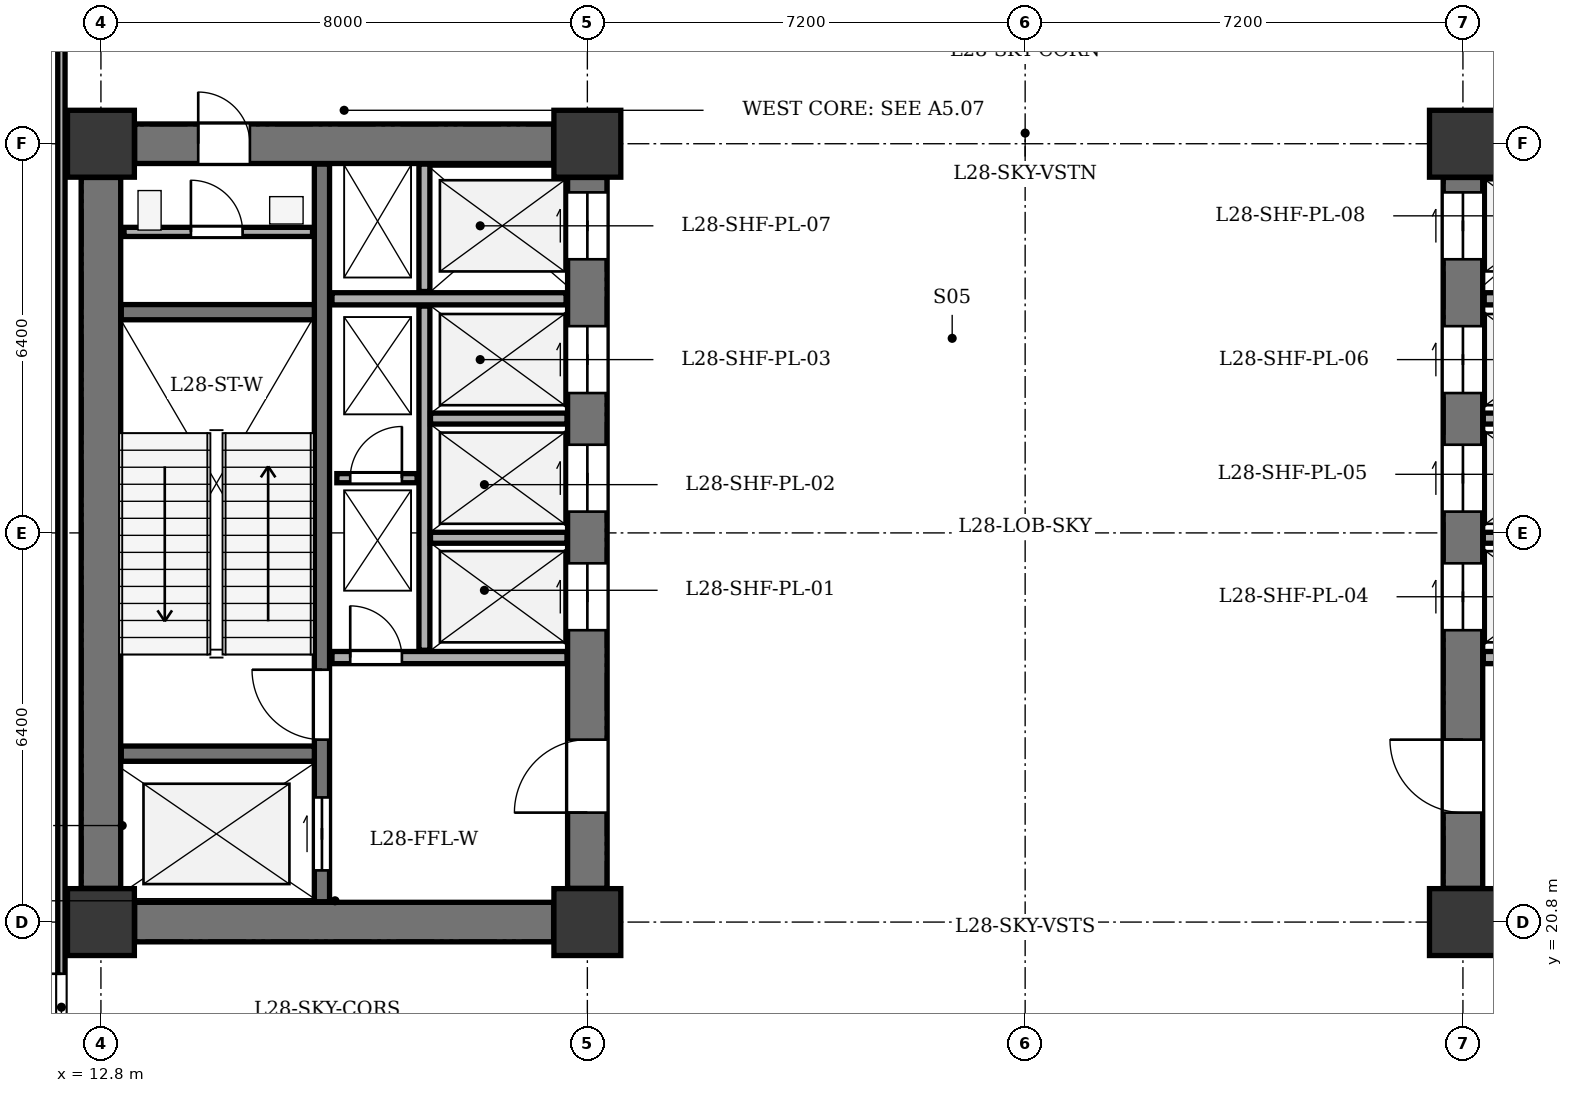
"""IFC4 building model, lengths in metres.
Left out: names, types, materials, properties, quantities, classifications, styles, units other than length and angle.
Written with IfcOpenShell. Run it as: python <this file> out.ifc"""

import sys

from ifc_helpers import new_model, si_unit, direction, frame, frame_2d, origin, origin_2d, place, context, subcontext, project, spatial, rectangle, extrude, element, fill, save


model = new_model("IFC4")
c1 = context("Model", 3, precision=1e-05, world=origin(), true_north=direction((0.0, 1.0)))
c2 = subcontext(c1, "Body", "Model", "MODEL_VIEW")
j1 = project(units=[si_unit("LENGTHUNIT", "METRE"), si_unit("PLANEANGLEUNIT", "RADIAN")], contexts=[c1])
p1 = place(None, origin())
s1 = spatial("IfcSite", under=j1, at=p1, CompositionType="ELEMENT")
p2 = place(p1, origin())
s2 = spatial("IfcBuilding", under=s1, at=p2, CompositionType="ELEMENT")
p3 = place(p2, frame((0.0, 0.0, 115.5)))
s3 = spatial("IfcBuildingStorey", under=s2, at=p3, CompositionType="ELEMENT", Elevation=115.5)
for number, where, z_axis, x_axis in (
    (1, (12.8, 20.8, 0.0), (0.0, 0.0, 1.0), (1.0, 0.0, 0.0)),
    (2, (20.8, 20.8, 0.0), (0.0, 0.0, 1.0), (1.0, 0.0, 0.0)),
    (3, (12.8, 33.6, 0.0), (0.0, 0.0, 1.0), (1.0, 0.0, 0.0)),
    (4, (20.8, 33.6, 0.0), (0.0, 0.0, 1.0), (1.0, 0.0, 0.0)),
    (5, (35.2, 20.8, 0.0), (0.0, 0.0, 1.0), (1.0, 0.0, 0.0)),
    (6, (35.2, 33.6, 0.0), (0.0, 0.0, 1.0), (1.0, 0.0, 0.0)),
):
    element("IfcColumn", number, at=place(p3, frame(where, z_axis=z_axis, x_axis=x_axis)), inside=s3, PredefinedType="COLUMN", context=c2, shape_type="SweptSolid", body=[
        extrude(rectangle(XDim=1.1, YDim=1.1, at=origin_2d()), origin(), (0.0, 0.0, 1.0), 4.8),
    ])
p4 = place(p3, frame((12.8, 21.355, 0.0), z_axis=(0.0, 0.0, 1.0), x_axis=(0.0, 1.0, 0.0)))
e7 = element("IfcWall", 7, at=p4, inside=s3, PredefinedType="SHEAR", context=c2, shape_type="SweptSolid", body=[
    extrude(rectangle(XDim=11.69, YDim=0.65, at=frame_2d((5.845, 0.0))), origin(), (0.0, 0.0, 1.0), 4.35),
])
p5 = place(p3, frame((13.355, 20.8, 0.0), z_axis=(0.0, 0.0, 1.0), x_axis=(1.0, 0.0, 0.0)))
e8 = element("IfcWall", 8, at=p5, inside=s3, PredefinedType="SHEAR", context=c2, shape_type="SweptSolid", body=[
    extrude(rectangle(XDim=6.89, YDim=0.65, at=frame_2d((3.445, 0.0))), origin(), (0.0, 0.0, 1.0), 4.35),
])
p6 = place(p3, frame((13.355, 33.6, 0.0), z_axis=(0.0, 0.0, 1.0), x_axis=(1.0, 0.0, 0.0)))
e9 = element("IfcWall", 9, at=p6, inside=s3, PredefinedType="SHEAR", context=c2, shape_type="SweptSolid", body=[
    extrude(rectangle(XDim=6.89, YDim=0.65, at=frame_2d((3.445, 0.0))), origin(), (0.0, 0.0, 1.0), 4.35),
])
p7 = place(p6, frame((1.045, 0.0, 0.0)))
e10 = element("IfcOpeningElement", 10, at=p7, cuts=e9, PredefinedType="OPENING", context=c2, shape_type="SweptSolid", body=[
    extrude(rectangle(XDim=0.85, YDim=2.02, at=frame_2d((0.425, 1.01))), frame((0.0, 0.335, 0.0), z_axis=(0.0, -1.0, 0.0), x_axis=(1.0, 0.0, 0.0)), (0.0, 0.0, 1.0), 0.67),
])
p8 = place(p3, frame((20.8, 21.355, 0.0), z_axis=(0.0, 0.0, 1.0), x_axis=(0.0, 1.0, 0.0)))
e11 = element("IfcWall", 11, at=p8, inside=s3, PredefinedType="SHEAR", context=c2, shape_type="SweptSolid", body=[
    extrude(rectangle(XDim=11.69, YDim=0.65, at=frame_2d((5.845, 0.0))), origin(), (0.0, 0.0, 1.0), 4.35),
])
p9 = place(p8, frame((1.245, 0.0, 0.0)))
e12 = element("IfcOpeningElement", 12, at=p9, cuts=e11, PredefinedType="OPENING", context=c2, shape_type="SweptSolid", body=[
    extrude(rectangle(XDim=1.2, YDim=2.15, at=frame_2d((0.6, 1.075))), frame((0.0, 0.335, 0.0), z_axis=(0.0, -1.0, 0.0), x_axis=(1.0, 0.0, 0.0)), (0.0, 0.0, 1.0), 0.67),
])
p10 = place(p8, frame((4.245, 0.0, 0.0)))
e13 = element("IfcOpeningElement", 13, at=p10, cuts=e11, PredefinedType="OPENING", context=c2, shape_type="SweptSolid", body=[
    extrude(rectangle(XDim=1.1, YDim=2.1, at=frame_2d((0.55, 1.05))), frame((0.0, 0.335, 0.0), z_axis=(0.0, -1.0, 0.0), x_axis=(1.0, 0.0, 0.0)), (0.0, 0.0, 1.0), 0.67),
])
p11 = place(p8, frame((6.195, 0.0, 0.0)))
e14 = element("IfcOpeningElement", 14, at=p11, cuts=e11, PredefinedType="OPENING", context=c2, shape_type="SweptSolid", body=[
    extrude(rectangle(XDim=1.1, YDim=2.1, at=frame_2d((0.55, 1.05))), frame((0.0, 0.335, 0.0), z_axis=(0.0, -1.0, 0.0), x_axis=(1.0, 0.0, 0.0)), (0.0, 0.0, 1.0), 0.67),
])
p12 = place(p8, frame((8.145, 0.0, 0.0)))
e15 = element("IfcOpeningElement", 15, at=p12, cuts=e11, PredefinedType="OPENING", context=c2, shape_type="SweptSolid", body=[
    extrude(rectangle(XDim=1.1, YDim=2.1, at=frame_2d((0.55, 1.05))), frame((0.0, 0.335, 0.0), z_axis=(0.0, -1.0, 0.0), x_axis=(1.0, 0.0, 0.0)), (0.0, 0.0, 1.0), 0.67),
])
p13 = place(p8, frame((10.345, 0.0, 0.0)))
e16 = element("IfcOpeningElement", 16, at=p13, cuts=e11, PredefinedType="OPENING", context=c2, shape_type="SweptSolid", body=[
    extrude(rectangle(XDim=1.1, YDim=2.1, at=frame_2d((0.55, 1.05))), frame((0.0, 0.335, 0.0), z_axis=(0.0, -1.0, 0.0), x_axis=(1.0, 0.0, 0.0)), (0.0, 0.0, 1.0), 0.67),
])
p14 = place(p3, frame((16.435, 21.135, 0.0), z_axis=(0.0, 0.0, 1.0), x_axis=(0.0, 1.0, 0.0)))
e17 = element("IfcWall", 17, at=p14, inside=s3, PredefinedType="SHEAR", context=c2, shape_type="SweptSolid", body=[
    extrude(rectangle(XDim=12.13, YDim=0.25, at=frame_2d((6.065, 0.0))), origin(), (0.0, 0.0, 1.0), 4.35),
])
p15 = place(p14, frame((0.515, 0.0, 0.0)))
e18 = element("IfcOpeningElement", 18, at=p15, cuts=e17, PredefinedType="OPENING", context=c2, shape_type="SweptSolid", body=[
    extrude(rectangle(XDim=1.2, YDim=2.15, at=frame_2d((0.6, 1.075))), frame((0.0, 0.135, 0.0), z_axis=(0.0, -1.0, 0.0), x_axis=(1.0, 0.0, 0.0)), (0.0, 0.0, 1.0), 0.27),
])
p16 = place(p14, frame((2.665, 0.0, 0.0)))
e19 = element("IfcOpeningElement", 19, at=p16, cuts=e17, PredefinedType="OPENING", context=c2, shape_type="SweptSolid", body=[
    extrude(rectangle(XDim=1.15, YDim=2.15, at=frame_2d((0.575, 1.075))), frame((0.0, 0.135, 0.0), z_axis=(0.0, -1.0, 0.0), x_axis=(1.0, 0.0, 0.0)), (0.0, 0.0, 1.0), 0.27),
])
for number, where, z_axis, x_axis in (
    (20, (13.135, 23.57, 0.0), (0.0, 0.0, 1.0), (1.0, 0.0, 0.0)),
    (21, (13.135, 30.83, 0.0), (0.0, 0.0, 1.0), (1.0, 0.0, 0.0)),
):
    element("IfcWall", number, at=place(p3, frame(where, z_axis=z_axis, x_axis=x_axis)), inside=s3, PredefinedType="SHEAR", context=c2, shape_type="SweptSolid", body=[
        extrude(rectangle(XDim=3.175, YDim=0.25, at=frame_2d((1.587, 0.0))), origin(), (0.0, 0.0, 1.0), 4.35),
    ])
p17 = place(p3, frame((16.6, 25.15, 0.0), z_axis=(0.0, 0.0, 1.0), x_axis=(1.0, 0.0, 0.0)))
e22 = element("IfcWall", 22, at=p17, inside=s3, PredefinedType="SOLIDWALL", context=c2, shape_type="SweptSolid", body=[
    extrude(rectangle(XDim=3.865, YDim=0.2, at=frame_2d((1.933, 0.0))), origin(), (0.0, 0.0, 1.0), 4.35),
])
p18 = place(p17, frame((0.3, 0.0, 0.0)))
e23 = element("IfcOpeningElement", 23, at=p18, cuts=e22, PredefinedType="OPENING", context=c2, shape_type="SweptSolid", body=[
    extrude(rectangle(XDim=0.85, YDim=2.02, at=frame_2d((0.425, 1.01))), frame((0.0, 0.11, 0.0), z_axis=(0.0, -1.0, 0.0), x_axis=(1.0, 0.0, 0.0)), (0.0, 0.0, 1.0), 0.22),
])
p19 = place(p3, frame((16.6, 31.05, 0.0), z_axis=(0.0, 0.0, 1.0), x_axis=(1.0, 0.0, 0.0)))
e24 = element("IfcWall", 24, at=p19, inside=s3, PredefinedType="SOLIDWALL", context=c2, shape_type="SweptSolid", body=[
    extrude(rectangle(XDim=3.85, YDim=0.2, at=frame_2d((1.925, 0.0))), origin(), (0.0, 0.0, 1.0), 4.35),
])
p20 = place(p3, frame((18.12, 25.27, 0.0), z_axis=(0.0, 0.0, 1.0), x_axis=(0.0, 1.0, 0.0)))
e25 = element("IfcWall", 25, at=p20, inside=s3, PredefinedType="PARTITIONING", context=c2, shape_type="SweptSolid", body=[
    extrude(rectangle(XDim=5.66, YDim=0.18, at=frame_2d((2.83, 0.0))), origin(), (0.0, 0.0, 1.0), 4.35),
])
p21 = place(p3, frame((18.12, 31.17, 0.0), z_axis=(0.0, 0.0, 1.0), x_axis=(0.0, 1.0, 0.0)))
e26 = element("IfcWall", 26, at=p21, inside=s3, PredefinedType="PARTITIONING", context=c2, shape_type="SweptSolid", body=[
    extrude(rectangle(XDim=2.095, YDim=0.18, at=frame_2d((1.047, 0.0))), origin(), (0.0, 0.0, 1.0), 4.35),
])
for number, where, z_axis, x_axis in (
    (27, (18.22, 27.12, 0.0), (0.0, 0.0, 1.0), (1.0, 0.0, 0.0)),
    (28, (18.22, 29.08, 0.0), (0.0, 0.0, 1.0), (1.0, 0.0, 0.0)),
):
    element("IfcWall", number, at=place(p3, frame(where, z_axis=z_axis, x_axis=x_axis)), inside=s3, PredefinedType="PARTITIONING", context=c2, shape_type="SweptSolid", body=[
        extrude(rectangle(XDim=2.245, YDim=0.18, at=frame_2d((1.123, 0.0))), origin(), (0.0, 0.0, 1.0), 4.35),
    ])
p22 = place(p3, frame((35.2, 21.355, 0.0), z_axis=(0.0, 0.0, 1.0), x_axis=(0.0, 1.0, 0.0)))
e29 = element("IfcWall", 29, at=p22, inside=s3, PredefinedType="SHEAR", context=c2, shape_type="SweptSolid", body=[
    extrude(rectangle(XDim=11.69, YDim=0.65, at=frame_2d((5.845, 0.0))), origin(), (0.0, 0.0, 1.0), 4.35),
])
p23 = place(p22, frame((1.245, 0.0, 0.0)))
e30 = element("IfcOpeningElement", 30, at=p23, cuts=e29, PredefinedType="OPENING", context=c2, shape_type="SweptSolid", body=[
    extrude(rectangle(XDim=1.2, YDim=2.15, at=frame_2d((0.6, 1.075))), frame((0.0, 0.335, 0.0), z_axis=(0.0, -1.0, 0.0), x_axis=(1.0, 0.0, 0.0)), (0.0, 0.0, 1.0), 0.67),
])
p24 = place(p22, frame((4.245, 0.0, 0.0)))
e31 = element("IfcOpeningElement", 31, at=p24, cuts=e29, PredefinedType="OPENING", context=c2, shape_type="SweptSolid", body=[
    extrude(rectangle(XDim=1.1, YDim=2.1, at=frame_2d((0.55, 1.05))), frame((0.0, 0.335, 0.0), z_axis=(0.0, -1.0, 0.0), x_axis=(1.0, 0.0, 0.0)), (0.0, 0.0, 1.0), 0.67),
])
p25 = place(p22, frame((6.195, 0.0, 0.0)))
e32 = element("IfcOpeningElement", 32, at=p25, cuts=e29, PredefinedType="OPENING", context=c2, shape_type="SweptSolid", body=[
    extrude(rectangle(XDim=1.1, YDim=2.1, at=frame_2d((0.55, 1.05))), frame((0.0, 0.335, 0.0), z_axis=(0.0, -1.0, 0.0), x_axis=(1.0, 0.0, 0.0)), (0.0, 0.0, 1.0), 0.67),
])
p26 = place(p22, frame((8.145, 0.0, 0.0)))
e33 = element("IfcOpeningElement", 33, at=p26, cuts=e29, PredefinedType="OPENING", context=c2, shape_type="SweptSolid", body=[
    extrude(rectangle(XDim=1.1, YDim=2.1, at=frame_2d((0.55, 1.05))), frame((0.0, 0.335, 0.0), z_axis=(0.0, -1.0, 0.0), x_axis=(1.0, 0.0, 0.0)), (0.0, 0.0, 1.0), 0.67),
])
p27 = place(p22, frame((10.345, 0.0, 0.0)))
e34 = element("IfcOpeningElement", 34, at=p27, cuts=e29, PredefinedType="OPENING", context=c2, shape_type="SweptSolid", body=[
    extrude(rectangle(XDim=1.1, YDim=2.1, at=frame_2d((0.55, 1.05))), frame((0.0, 0.335, 0.0), z_axis=(0.0, -1.0, 0.0), x_axis=(1.0, 0.0, 0.0)), (0.0, 0.0, 1.0), 0.67),
])
p28 = place(p3, frame((35.535, 25.15, 0.0), z_axis=(0.0, 0.0, 1.0), x_axis=(1.0, 0.0, 0.0)))
e35 = element("IfcWall", 35, at=p28, inside=s3, PredefinedType="SOLIDWALL", context=c2, shape_type="SweptSolid", body=[
    extrude(rectangle(XDim=3.865, YDim=0.2, at=frame_2d((1.933, 0.0))), origin(), (0.0, 0.0, 1.0), 4.35),
])
p29 = place(p3, frame((35.55, 31.05, 0.0), z_axis=(0.0, 0.0, 1.0), x_axis=(1.0, 0.0, 0.0)))
e36 = element("IfcWall", 36, at=p29, inside=s3, PredefinedType="SOLIDWALL", context=c2, shape_type="SweptSolid", body=[
    extrude(rectangle(XDim=2.25, YDim=0.2, at=frame_2d((1.125, 0.0))), origin(), (0.0, 0.0, 1.0), 4.35),
])
for number, where, z_axis, x_axis in (
    (37, (35.535, 27.12, 0.0), (0.0, 0.0, 1.0), (1.0, 0.0, 0.0)),
    (38, (35.535, 29.08, 0.0), (0.0, 0.0, 1.0), (1.0, 0.0, 0.0)),
):
    element("IfcWall", number, at=place(p3, frame(where, z_axis=z_axis, x_axis=x_axis)), inside=s3, PredefinedType="PARTITIONING", context=c2, shape_type="SweptSolid", body=[
        extrude(rectangle(XDim=2.245, YDim=0.18, at=frame_2d((1.123, 0.0))), origin(), (0.0, 0.0, 1.0), 4.35),
    ])
p30 = place(p3, frame((13.18, 32.15, 0.0), z_axis=(0.0, 0.0, 1.0), x_axis=(1.0, 0.0, 0.0)))
e39 = element("IfcWall", 39, at=p30, inside=s3, PredefinedType="PARTITIONING", context=c2, shape_type="SweptSolid", body=[
    extrude(rectangle(XDim=3.1, YDim=0.15, at=frame_2d((1.55, 0.0))), origin(), (0.0, 0.0, 1.0), 4.35),
])
p31 = place(p30, frame((1.1, 0.0, 0.0)))
e40 = element("IfcOpeningElement", 40, at=p31, cuts=e39, PredefinedType="OPENING", context=c2, shape_type="SweptSolid", body=[
    extrude(rectangle(XDim=0.85, YDim=2.02, at=frame_2d((0.425, 1.01))), frame((0.0, 0.085, 0.0), z_axis=(0.0, -1.0, 0.0), x_axis=(1.0, 0.0, 0.0)), (0.0, 0.0, 1.0), 0.17),
])
p32 = place(p3, frame((16.68, 28.1, 0.0), z_axis=(0.0, 0.0, 1.0), x_axis=(1.0, 0.0, 0.0)))
e41 = element("IfcWall", 41, at=p32, inside=s3, PredefinedType="PARTITIONING", context=c2, shape_type="SweptSolid", body=[
    extrude(rectangle(XDim=1.32, YDim=0.15, at=frame_2d((0.66, 0.0))), origin(), (0.0, 0.0, 1.0), 4.35),
])
p33 = place(p32, frame((0.22, 0.0, 0.0)))
e42 = element("IfcOpeningElement", 42, at=p33, cuts=e41, PredefinedType="OPENING", context=c2, shape_type="SweptSolid", body=[
    extrude(rectangle(XDim=0.85, YDim=2.02, at=frame_2d((0.425, 1.01))), frame((0.0, 0.085, 0.0), z_axis=(0.0, -1.0, 0.0), x_axis=(1.0, 0.0, 0.0)), (0.0, 0.0, 1.0), 0.17),
])
p34 = place(p3, frame((12.15, 18.465, 0.0), z_axis=(0.0, 0.0, 1.0), x_axis=(0.0, 1.0, 0.0)))
e43 = element("IfcWall", 43, at=p34, inside=s3, PredefinedType="PARTITIONING", context=c2, shape_type="SweptSolid", body=[
    extrude(rectangle(XDim=17.67, YDim=0.12, at=frame_2d((8.835, 0.0))), origin(), (0.0, 0.0, 1.0), 4.35),
])
p35 = place(p34, frame((0.385, 0.0, 0.0)))
e44 = element("IfcOpeningElement", 44, at=p35, cuts=e43, PredefinedType="OPENING", context=c2, shape_type="SweptSolid", body=[
    extrude(rectangle(XDim=1.1, YDim=2.15, at=frame_2d((0.55, 1.075))), frame((0.0, 0.07, 0.0), z_axis=(0.0, -1.0, 0.0), x_axis=(1.0, 0.0, 0.0)), (0.0, 0.0, 1.0), 0.14),
])
p36 = place(p7, origin())
e45 = element("IfcDoor", 45, at=p36, inside=s3, OperationType="SINGLE_SWING_LEFT", PredefinedType="DOOR", context=c2, shape_type="SweptSolid", body=[
    extrude(rectangle(XDim=0.85, YDim=2.02, at=frame_2d((0.425, 1.01))), frame((0.0, 0.025, 0.0), z_axis=(0.0, -1.0, 0.0), x_axis=(1.0, 0.0, 0.0)), (0.0, 0.0, 1.0), 0.05),
])
fill(e10, e45)
p37 = place(p9, origin())
e46 = element("IfcDoor", 46, at=p37, inside=s3, OperationType="SINGLE_SWING_LEFT", PredefinedType="DOOR", context=c2, shape_type="SweptSolid", body=[
    extrude(rectangle(XDim=1.2, YDim=2.15, at=frame_2d((0.6, 1.075))), frame((0.0, 0.025, 0.0), z_axis=(0.0, -1.0, 0.0), x_axis=(1.0, 0.0, 0.0)), (0.0, 0.0, 1.0), 0.05),
])
fill(e12, e46)
p38 = place(p10, origin())
e47 = element("IfcDoor", 47, at=p38, inside=s3, OperationType="DOUBLE_DOOR_SLIDING", PredefinedType="DOOR", context=c2, shape_type="SweptSolid", body=[
    extrude(rectangle(XDim=1.1, YDim=2.1, at=frame_2d((0.55, 1.05))), frame((0.0, 0.025, 0.0), z_axis=(0.0, -1.0, 0.0), x_axis=(1.0, 0.0, 0.0)), (0.0, 0.0, 1.0), 0.05),
])
fill(e13, e47)
p39 = place(p11, origin())
e48 = element("IfcDoor", 48, at=p39, inside=s3, OperationType="DOUBLE_DOOR_SLIDING", PredefinedType="DOOR", context=c2, shape_type="SweptSolid", body=[
    extrude(rectangle(XDim=1.1, YDim=2.1, at=frame_2d((0.55, 1.05))), frame((0.0, 0.025, 0.0), z_axis=(0.0, -1.0, 0.0), x_axis=(1.0, 0.0, 0.0)), (0.0, 0.0, 1.0), 0.05),
])
fill(e14, e48)
p40 = place(p12, origin())
e49 = element("IfcDoor", 49, at=p40, inside=s3, OperationType="DOUBLE_DOOR_SLIDING", PredefinedType="DOOR", context=c2, shape_type="SweptSolid", body=[
    extrude(rectangle(XDim=1.1, YDim=2.1, at=frame_2d((0.55, 1.05))), frame((0.0, 0.025, 0.0), z_axis=(0.0, -1.0, 0.0), x_axis=(1.0, 0.0, 0.0)), (0.0, 0.0, 1.0), 0.05),
])
fill(e15, e49)
p41 = place(p13, origin())
e50 = element("IfcDoor", 50, at=p41, inside=s3, OperationType="DOUBLE_DOOR_SLIDING", PredefinedType="DOOR", context=c2, shape_type="SweptSolid", body=[
    extrude(rectangle(XDim=1.1, YDim=2.1, at=frame_2d((0.55, 1.05))), frame((0.0, 0.025, 0.0), z_axis=(0.0, -1.0, 0.0), x_axis=(1.0, 0.0, 0.0)), (0.0, 0.0, 1.0), 0.05),
])
fill(e16, e50)
p42 = place(p15, origin())
e51 = element("IfcDoor", 51, at=p42, inside=s3, OperationType="DOUBLE_DOOR_SLIDING", PredefinedType="DOOR", context=c2, shape_type="SweptSolid", body=[
    extrude(rectangle(XDim=1.2, YDim=2.15, at=frame_2d((0.6, 1.075))), frame((0.0, 0.025, 0.0), z_axis=(0.0, -1.0, 0.0), x_axis=(1.0, 0.0, 0.0)), (0.0, 0.0, 1.0), 0.05),
])
fill(e18, e51)
p43 = place(p16, origin())
e52 = element("IfcDoor", 52, at=p43, inside=s3, OperationType="SINGLE_SWING_RIGHT", PredefinedType="DOOR", context=c2, shape_type="SweptSolid", body=[
    extrude(rectangle(XDim=1.15, YDim=2.15, at=frame_2d((0.575, 1.075))), frame((0.0, 0.025, 0.0), z_axis=(0.0, -1.0, 0.0), x_axis=(1.0, 0.0, 0.0)), (0.0, 0.0, 1.0), 0.05),
])
fill(e19, e52)
p44 = place(p18, origin())
e53 = element("IfcDoor", 53, at=p44, inside=s3, OperationType="SINGLE_SWING_LEFT", PredefinedType="DOOR", context=c2, shape_type="SweptSolid", body=[
    extrude(rectangle(XDim=0.85, YDim=2.02, at=frame_2d((0.425, 1.01))), frame((0.0, 0.025, 0.0), z_axis=(0.0, -1.0, 0.0), x_axis=(1.0, 0.0, 0.0)), (0.0, 0.0, 1.0), 0.05),
])
fill(e23, e53)
p45 = place(p23, origin())
e54 = element("IfcDoor", 54, at=p45, inside=s3, OperationType="SINGLE_SWING_RIGHT", PredefinedType="DOOR", context=c2, shape_type="SweptSolid", body=[
    extrude(rectangle(XDim=1.2, YDim=2.15, at=frame_2d((0.6, 1.075))), frame((0.0, 0.025, 0.0), z_axis=(0.0, -1.0, 0.0), x_axis=(1.0, 0.0, 0.0)), (0.0, 0.0, 1.0), 0.05),
])
fill(e30, e54)
p46 = place(p24, origin())
e55 = element("IfcDoor", 55, at=p46, inside=s3, OperationType="DOUBLE_DOOR_SLIDING", PredefinedType="DOOR", context=c2, shape_type="SweptSolid", body=[
    extrude(rectangle(XDim=1.1, YDim=2.1, at=frame_2d((0.55, 1.05))), frame((0.0, 0.025, 0.0), z_axis=(0.0, -1.0, 0.0), x_axis=(1.0, 0.0, 0.0)), (0.0, 0.0, 1.0), 0.05),
])
fill(e31, e55)
p47 = place(p25, origin())
e56 = element("IfcDoor", 56, at=p47, inside=s3, OperationType="DOUBLE_DOOR_SLIDING", PredefinedType="DOOR", context=c2, shape_type="SweptSolid", body=[
    extrude(rectangle(XDim=1.1, YDim=2.1, at=frame_2d((0.55, 1.05))), frame((0.0, 0.025, 0.0), z_axis=(0.0, -1.0, 0.0), x_axis=(1.0, 0.0, 0.0)), (0.0, 0.0, 1.0), 0.05),
])
fill(e32, e56)
p48 = place(p26, origin())
e57 = element("IfcDoor", 57, at=p48, inside=s3, OperationType="DOUBLE_DOOR_SLIDING", PredefinedType="DOOR", context=c2, shape_type="SweptSolid", body=[
    extrude(rectangle(XDim=1.1, YDim=2.1, at=frame_2d((0.55, 1.05))), frame((0.0, 0.025, 0.0), z_axis=(0.0, -1.0, 0.0), x_axis=(1.0, 0.0, 0.0)), (0.0, 0.0, 1.0), 0.05),
])
fill(e33, e57)
p49 = place(p27, origin())
e58 = element("IfcDoor", 58, at=p49, inside=s3, OperationType="DOUBLE_DOOR_SLIDING", PredefinedType="DOOR", context=c2, shape_type="SweptSolid", body=[
    extrude(rectangle(XDim=1.1, YDim=2.1, at=frame_2d((0.55, 1.05))), frame((0.0, 0.025, 0.0), z_axis=(0.0, -1.0, 0.0), x_axis=(1.0, 0.0, 0.0)), (0.0, 0.0, 1.0), 0.05),
])
fill(e34, e58)
p50 = place(p31, origin())
e59 = element("IfcDoor", 59, at=p50, inside=s3, OperationType="SINGLE_SWING_LEFT", PredefinedType="DOOR", context=c2, shape_type="SweptSolid", body=[
    extrude(rectangle(XDim=0.85, YDim=2.02, at=frame_2d((0.425, 1.01))), frame((0.0, 0.025, 0.0), z_axis=(0.0, -1.0, 0.0), x_axis=(1.0, 0.0, 0.0)), (0.0, 0.0, 1.0), 0.05),
])
fill(e40, e59)
p51 = place(p33, origin())
e60 = element("IfcDoor", 60, at=p51, inside=s3, OperationType="SINGLE_SWING_RIGHT", PredefinedType="DOOR", context=c2, shape_type="SweptSolid", body=[
    extrude(rectangle(XDim=0.85, YDim=2.02, at=frame_2d((0.425, 1.01))), frame((0.0, 0.025, 0.0), z_axis=(0.0, -1.0, 0.0), x_axis=(1.0, 0.0, 0.0)), (0.0, 0.0, 1.0), 0.05),
])
fill(e42, e60)
p52 = place(p35, origin())
e61 = element("IfcDoor", 61, at=p52, inside=s3, OperationType="SINGLE_SWING_RIGHT", PredefinedType="DOOR", context=c2, shape_type="SweptSolid", body=[
    extrude(rectangle(XDim=1.1, YDim=2.15, at=frame_2d((0.55, 1.075))), frame((0.0, 0.025, 0.0), z_axis=(0.0, -1.0, 0.0), x_axis=(1.0, 0.0, 0.0)), (0.0, 0.0, 1.0), 0.05),
])
fill(e44, e61)
save(model, sys.argv[1])
